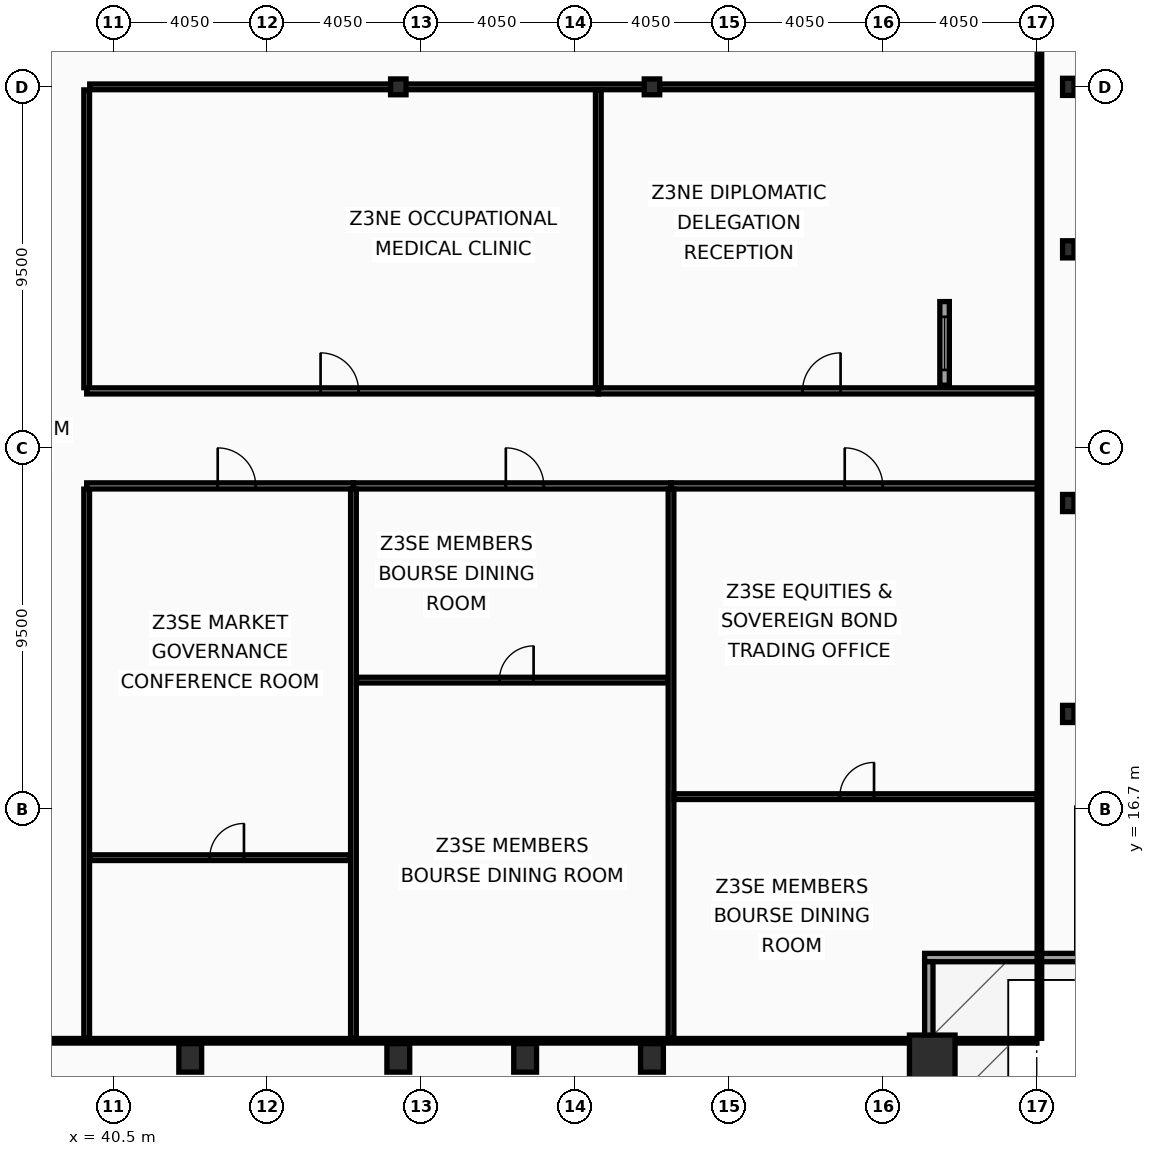
"""IFC4 building model, lengths in metres.
Left out: names, types, materials, properties, quantities, classifications, styles, units other than length and angle.
Written with IfcOpenShell. Run it as: python <this file> out.ifc"""

import sys

from ifc_helpers import new_model, si_unit, direction, frame, frame_2d, origin, origin_2d, place, context, subcontext, project, spatial, rectangle, hollow_rectangle, i_section, extrude, element, fill, save


model = new_model("IFC4")
c1 = context("Model", 3, precision=1e-05, world=origin(), true_north=direction((0.0, 1.0)))
c2 = subcontext(c1, "Body", "Model", "MODEL_VIEW")
j1 = project(units=[si_unit("LENGTHUNIT", "METRE"), si_unit("PLANEANGLEUNIT", "RADIAN")], contexts=[c1])
p1 = place(None, origin())
s1 = spatial("IfcSite", under=j1, at=p1, CompositionType="ELEMENT")
p2 = place(p1, origin())
s2 = spatial("IfcBuilding", under=s1, at=p2, CompositionType="ELEMENT")
p3 = place(p2, frame((0.0, 0.0, 188.6)))
s3 = spatial("IfcBuildingStorey", under=s2, at=p3, CompositionType="ELEMENT", Elevation=188.6)
p4 = place(p3, frame((62.05, 10.15, 0.0), z_axis=(0.0, 0.0, 1.0), x_axis=(1.0, 0.0, 0.0)))
e1 = element("IfcColumn", 1, at=p4, inside=s3, PredefinedType="COLUMN", context=c2, shape_type="SweptSolid", body=[
    extrude(hollow_rectangle(XDim=1.2, YDim=1.2, WallThickness=0.06, at=origin_2d()), origin(), (0.0, 0.0, 1.0), 3.6),
])
for number, where, z_axis, x_axis in (
    (2, (42.525, 10.15, 0.0), (0.0, 0.0, 1.0), (1.0, 0.0, 0.0)),
    (3, (48.0, 10.15, 0.0), (0.0, 0.0, 1.0), (1.0, 0.0, 0.0)),
    (4, (51.337, 10.15, 0.0), (0.0, 0.0, 1.0), (1.0, 0.0, 0.0)),
    (5, (54.675, 10.15, 0.0), (0.0, 0.0, 1.0), (1.0, 0.0, 0.0)),
):
    element("IfcColumn", number, at=place(p3, frame(where, z_axis=z_axis, x_axis=x_axis)), inside=s3, PredefinedType="COLUMN", context=c2, shape_type="SweptSolid", body=[
        extrude(hollow_rectangle(XDim=0.6, YDim=0.75, WallThickness=0.045, at=origin_2d()), origin(), (0.0, 0.0, 1.0), 3.6),
    ])
for number, where, z_axis, x_axis in (
    (6, (65.63, 19.2, 0.0), (0.0, 0.0, 1.0), (1.0, 0.0, 0.0)),
    (7, (65.63, 24.75, 0.0), (0.0, 0.0, 1.0), (1.0, 0.0, 0.0)),
    (8, (65.63, 31.425, 0.0), (0.0, 0.0, 1.0), (1.0, 0.0, 0.0)),
    (9, (65.63, 35.7, 0.0), (0.0, 0.0, 1.0), (1.0, 0.0, 0.0)),
):
    element("IfcColumn", number, at=place(p3, frame(where, z_axis=z_axis, x_axis=x_axis)), inside=s3, PredefinedType="COLUMN", context=c2, shape_type="SweptSolid", body=[
        extrude(i_section(OverallWidth=0.3, OverallDepth=0.45, WebThickness=0.014, FlangeThickness=0.026, at=origin_2d()), origin(), (0.0, 0.0, 1.0), 3.6),
    ])
for number, where, z_axis, x_axis in (
    (10, (48.0, 35.7, 0.0), (0.0, 0.0, 1.0), (1.0, 0.0, 0.0)),
    (11, (54.675, 35.7, 0.0), (0.0, 0.0, 1.0), (1.0, 0.0, 0.0)),
):
    element("IfcColumn", number, at=place(p3, frame(where, z_axis=z_axis, x_axis=x_axis)), inside=s3, PredefinedType="COLUMN", context=c2, shape_type="SweptSolid", body=[
        extrude(i_section(OverallWidth=0.406, OverallDepth=0.416, WebThickness=0.03, FlangeThickness=0.048, at=origin_2d()), origin(), (0.0, 0.0, 1.0), 3.6),
    ])
p5 = place(p3, frame((66.07, 12.79, 0.0), z_axis=(0.0, 0.0, 1.0), x_axis=(-1.0, 0.0, 0.0)))
e12 = element("IfcWall", 12, at=p5, inside=s3, PredefinedType="SOLIDWALL", context=c2, shape_type="SweptSolid", body=[
    extrude(rectangle(XDim=4.22, YDim=0.22, at=frame_2d((2.11, 0.0))), origin(), (0.0, 0.0, 1.0), 2.83),
])
p6 = place(p3, frame((61.96, 12.68, 0.0), z_axis=(0.0, 0.0, 1.0), x_axis=(0.0, -1.0, 0.0)))
e13 = element("IfcWall", 13, at=p6, inside=s3, PredefinedType="SOLIDWALL", context=c2, shape_type="SweptSolid", body=[
    extrude(rectangle(XDim=3.91, YDim=0.22, at=frame_2d((1.955, 0.0))), origin(), (0.0, 0.0, 1.0), 2.83),
])
p7 = place(p3, frame((62.375, 27.85, 0.0), z_axis=(0.0, 0.0, 1.0), x_axis=(0.0, 1.0, 0.0)))
e14 = element("IfcWall", 14, at=p7, inside=s3, PredefinedType="PARAPET", context=c2, shape_type="SweptSolid", body=[
    extrude(rectangle(XDim=2.2, YDim=0.25, at=frame_2d((1.1, 0.0))), origin(), (0.0, 0.0, 1.0), 0.88),
])
p8 = place(p7, frame((0.4, 0.0, 0.16)))
e15 = element("IfcOpeningElement", 15, at=p8, cuts=e14, PredefinedType="OPENING", context=c2, shape_type="SweptSolid", body=[
    extrude(rectangle(XDim=1.4, YDim=0.5, at=frame_2d((0.7, 0.25))), frame((0.0, 0.135, 0.0), z_axis=(0.0, -1.0, 0.0), x_axis=(1.0, 0.0, 0.0)), (0.0, 0.0, 1.0), 0.27),
])
p9 = place(p3, frame((39.8, 10.665, 0.0), z_axis=(0.0, 0.0, 1.0), x_axis=(0.0, 1.0, 0.0)))
e16 = element("IfcWall", 16, at=p9, inside=s3, PredefinedType="PARTITIONING", context=c2, shape_type="SweptSolid", body=[
    extrude(rectangle(XDim=14.45, YDim=0.15, at=frame_2d((7.225, 0.0))), origin(), (0.0, 0.0, 1.0), 2.93),
])
p10 = place(p3, frame((39.8, 27.785, 0.0), z_axis=(0.0, 0.0, 1.0), x_axis=(0.0, 1.0, 0.0)))
e17 = element("IfcWall", 17, at=p10, inside=s3, PredefinedType="PARTITIONING", context=c2, shape_type="SweptSolid", body=[
    extrude(rectangle(XDim=7.835, YDim=0.15, at=frame_2d((3.917, 0.0))), origin(), (0.0, 0.0, 1.0), 2.93),
])
p11 = place(p3, frame((39.88, 35.7, 0.0), z_axis=(0.0, 0.0, 1.0), x_axis=(1.0, 0.0, 0.0)))
e18 = element("IfcWall", 18, at=p11, inside=s3, PredefinedType="PARTITIONING", context=c2, shape_type="SweptSolid", body=[
    extrude(rectangle(XDim=24.925, YDim=0.15, at=frame_2d((12.462, 0.0))), origin(), (0.0, 0.0, 1.0), 2.73),
])
p12 = place(p3, frame((39.8, 25.2, 0.0), z_axis=(0.0, 0.0, 1.0), x_axis=(1.0, 0.0, 0.0)))
e19 = element("IfcWall", 19, at=p12, inside=s3, PredefinedType="PARTITIONING", context=c2, shape_type="SweptSolid", body=[
    extrude(rectangle(XDim=7.02, YDim=0.16, at=frame_2d((3.51, 0.0))), origin(), (0.0, 0.0, 1.0), 2.73),
])
p13 = place(p12, frame((3.448, 0.0, 0.0)))
e20 = element("IfcOpeningElement", 20, at=p13, cuts=e19, PredefinedType="OPENING", context=c2, shape_type="SweptSolid", body=[
    extrude(rectangle(XDim=1.0, YDim=2.05, at=frame_2d((0.5, 1.025))), frame((0.0, 0.09, 0.0), z_axis=(0.0, -1.0, 0.0), x_axis=(1.0, 0.0, 0.0)), (0.0, 0.0, 1.0), 0.18),
])
p14 = place(p3, frame((39.88, 15.418, 0.0), z_axis=(0.0, 0.0, 1.0), x_axis=(1.0, 0.0, 0.0)))
e21 = element("IfcWall", 21, at=p14, inside=s3, PredefinedType="PARTITIONING", context=c2, shape_type="SweptSolid", body=[
    extrude(rectangle(XDim=6.86, YDim=0.15, at=frame_2d((3.43, 0.0))), origin(), (0.0, 0.0, 1.0), 2.73),
])
p15 = place(p14, frame((3.159, 0.0, 0.0)))
e22 = element("IfcOpeningElement", 22, at=p15, cuts=e21, PredefinedType="OPENING", context=c2, shape_type="SweptSolid", body=[
    extrude(rectangle(XDim=0.9, YDim=2.05, at=frame_2d((0.45, 1.025))), frame((0.0, 0.085, 0.0), z_axis=(0.0, -1.0, 0.0), x_axis=(1.0, 0.0, 0.0)), (0.0, 0.0, 1.0), 0.17),
])
p16 = place(p3, frame((46.82, 25.2, 0.0), z_axis=(0.0, 0.0, 1.0), x_axis=(1.0, 0.0, 0.0)))
e23 = element("IfcWall", 23, at=p16, inside=s3, PredefinedType="PARTITIONING", context=c2, shape_type="SweptSolid", body=[
    extrude(rectangle(XDim=8.357, YDim=0.16, at=frame_2d((4.178, 0.0))), origin(), (0.0, 0.0, 1.0), 2.73),
])
p17 = place(p16, frame((4.01, 0.0, 0.0)))
e24 = element("IfcOpeningElement", 24, at=p17, cuts=e23, PredefinedType="OPENING", context=c2, shape_type="SweptSolid", body=[
    extrude(rectangle(XDim=1.0, YDim=2.05, at=frame_2d((0.5, 1.025))), frame((0.0, 0.09, 0.0), z_axis=(0.0, -1.0, 0.0), x_axis=(1.0, 0.0, 0.0)), (0.0, 0.0, 1.0), 0.18),
])
p18 = place(p3, frame((46.82, 10.665, 0.0), z_axis=(0.0, 0.0, 1.0), x_axis=(0.0, 1.0, 0.0)))
e25 = element("IfcWall", 25, at=p18, inside=s3, PredefinedType="PARTITIONING", context=c2, shape_type="SweptSolid", body=[
    extrude(rectangle(XDim=14.45, YDim=0.15, at=frame_2d((7.225, 0.0))), origin(), (0.0, 0.0, 1.0), 2.93),
])
p19 = place(p3, frame((46.9, 20.09, 0.0), z_axis=(0.0, 0.0, 1.0), x_axis=(1.0, 0.0, 0.0)))
e26 = element("IfcWall", 26, at=p19, inside=s3, PredefinedType="PARTITIONING", context=c2, shape_type="SweptSolid", body=[
    extrude(rectangle(XDim=8.197, YDim=0.15, at=frame_2d((4.098, 0.0))), origin(), (0.0, 0.0, 1.0), 2.73),
])
p20 = place(p19, frame((3.76, 0.0, 0.0)))
e27 = element("IfcOpeningElement", 27, at=p20, cuts=e26, PredefinedType="OPENING", context=c2, shape_type="SweptSolid", body=[
    extrude(rectangle(XDim=0.9, YDim=2.05, at=frame_2d((0.45, 1.025))), frame((0.0, 0.085, 0.0), z_axis=(0.0, -1.0, 0.0), x_axis=(1.0, 0.0, 0.0)), (0.0, 0.0, 1.0), 0.17),
])
p21 = place(p3, frame((55.176, 25.2, 0.0), z_axis=(0.0, 0.0, 1.0), x_axis=(1.0, 0.0, 0.0)))
e28 = element("IfcWall", 28, at=p21, inside=s3, PredefinedType="PARTITIONING", context=c2, shape_type="SweptSolid", body=[
    extrude(rectangle(XDim=9.694, YDim=0.16, at=frame_2d((4.847, 0.0))), origin(), (0.0, 0.0, 1.0), 3.44),
])
p22 = place(p21, frame((4.571, 0.0, 0.0)))
e29 = element("IfcOpeningElement", 29, at=p22, cuts=e28, PredefinedType="OPENING", context=c2, shape_type="SweptSolid", body=[
    extrude(rectangle(XDim=1.0, YDim=2.05, at=frame_2d((0.5, 1.025))), frame((0.0, 0.09, 0.0), z_axis=(0.0, -1.0, 0.0), x_axis=(1.0, 0.0, 0.0)), (0.0, 0.0, 1.0), 0.18),
])
p23 = place(p3, frame((55.176, 10.665, 0.0), z_axis=(0.0, 0.0, 1.0), x_axis=(0.0, 1.0, 0.0)))
e30 = element("IfcWall", 30, at=p23, inside=s3, PredefinedType="PARTITIONING", context=c2, shape_type="SweptSolid", body=[
    extrude(rectangle(XDim=14.45, YDim=0.15, at=frame_2d((7.225, 0.0))), origin(), (0.0, 0.0, 1.0), 2.73),
])
p24 = place(p3, frame((55.256, 17.024, 0.0), z_axis=(0.0, 0.0, 1.0), x_axis=(1.0, 0.0, 0.0)))
e31 = element("IfcWall", 31, at=p24, inside=s3, PredefinedType="PARTITIONING", context=c2, shape_type="SweptSolid", body=[
    extrude(rectangle(XDim=9.549, YDim=0.15, at=frame_2d((4.774, 0.0))), origin(), (0.0, 0.0, 1.0), 2.83),
])
p25 = place(p24, frame((4.362, 0.0, 0.0)))
e32 = element("IfcOpeningElement", 32, at=p25, cuts=e31, PredefinedType="OPENING", context=c2, shape_type="SweptSolid", body=[
    extrude(rectangle(XDim=0.9, YDim=2.05, at=frame_2d((0.45, 1.025))), frame((0.0, 0.085, 0.0), z_axis=(0.0, -1.0, 0.0), x_axis=(1.0, 0.0, 0.0)), (0.0, 0.0, 1.0), 0.17),
])
p26 = place(p3, frame((39.8, 27.7, 0.0), z_axis=(0.0, 0.0, 1.0), x_axis=(1.0, 0.0, 0.0)))
e33 = element("IfcWall", 33, at=p26, inside=s3, PredefinedType="PARTITIONING", context=c2, shape_type="SweptSolid", body=[
    extrude(rectangle(XDim=13.463, YDim=0.16, at=frame_2d((6.732, 0.0))), origin(), (0.0, 0.0, 1.0), 2.73),
])
p27 = place(p26, frame((6.155, 0.0, 0.0)))
e34 = element("IfcOpeningElement", 34, at=p27, cuts=e33, PredefinedType="OPENING", context=c2, shape_type="SweptSolid", body=[
    extrude(rectangle(XDim=1.0, YDim=2.05, at=frame_2d((0.5, 1.025))), frame((0.0, 0.09, 0.0), z_axis=(0.0, -1.0, 0.0), x_axis=(1.0, 0.0, 0.0)), (0.0, 0.0, 1.0), 0.18),
])
p28 = place(p3, frame((53.263, 27.7, 0.0), z_axis=(0.0, 0.0, 1.0), x_axis=(1.0, 0.0, 0.0)))
e35 = element("IfcWall", 35, at=p28, inside=s3, PredefinedType="PARTITIONING", context=c2, shape_type="SweptSolid", body=[
    extrude(rectangle(XDim=11.607, YDim=0.16, at=frame_2d((5.803, 0.0))), origin(), (0.0, 0.0, 1.0), 2.73),
])
p29 = place(p28, frame((5.375, 0.0, 0.0)))
e36 = element("IfcOpeningElement", 36, at=p29, cuts=e35, PredefinedType="OPENING", context=c2, shape_type="SweptSolid", body=[
    extrude(rectangle(XDim=1.0, YDim=2.05, at=frame_2d((0.5, 1.025))), frame((0.0, 0.09, 0.0), z_axis=(0.0, -1.0, 0.0), x_axis=(1.0, 0.0, 0.0)), (0.0, 0.0, 1.0), 0.18),
])
p30 = place(p3, frame((53.263, 27.785, 0.0), z_axis=(0.0, 0.0, 1.0), x_axis=(0.0, 1.0, 0.0)))
e37 = element("IfcWall", 37, at=p30, inside=s3, PredefinedType="PARTITIONING", context=c2, shape_type="SweptSolid", body=[
    extrude(rectangle(XDim=7.835, YDim=0.15, at=frame_2d((3.917, 0.0))), origin(), (0.0, 0.0, 1.0), 2.93),
])
p31 = place(p3, frame((64.87, 10.665, 0.0), z_axis=(0.0, 0.0, 1.0), x_axis=(0.0, 1.0, 0.0)))
e38 = element("IfcWall", 38, at=p31, inside=s3, PredefinedType="PARTITIONING", context=c2, shape_type="SweptSolid", body=[
    extrude(rectangle(XDim=42.11, YDim=0.12, at=frame_2d((21.055, 0.0))), origin(), (0.0, 0.0, 1.0), 2.73),
])
p32 = place(p3, frame((8.095, 10.6, 0.0), z_axis=(0.0, 0.0, 1.0), x_axis=(1.0, 0.0, 0.0)))
e39 = element("IfcWall", 39, at=p32, inside=s3, PredefinedType="PARTITIONING", context=c2, shape_type="SweptSolid", body=[
    extrude(rectangle(XDim=56.71, YDim=0.12, at=frame_2d((28.355, 0.0))), origin(), (0.0, 0.0, 1.0), 2.73),
])
p33 = place(p8, origin())
e40 = element("IfcWindow", 40, at=p33, inside=s3, PartitioningType="SINGLE_PANEL", PredefinedType="SKYLIGHT", context=c2, shape_type="SweptSolid", body=[
    extrude(rectangle(XDim=1.4, YDim=0.5, at=frame_2d((0.7, 0.25))), frame((0.0, 0.03, 0.0), z_axis=(0.0, -1.0, 0.0), x_axis=(1.0, 0.0, 0.0)), (0.0, 0.0, 1.0), 0.06),
])
fill(e15, e40)
p34 = place(p13, origin())
e41 = element("IfcDoor", 41, at=p34, inside=s3, OperationType="SINGLE_SWING_LEFT", PredefinedType="DOOR", context=c2, shape_type="SweptSolid", body=[
    extrude(rectangle(XDim=1.0, YDim=2.05, at=frame_2d((0.5, 1.025))), frame((0.0, 0.025, 0.0), z_axis=(0.0, -1.0, 0.0), x_axis=(1.0, 0.0, 0.0)), (0.0, 0.0, 1.0), 0.05),
])
fill(e20, e41)
p35 = place(p15, origin())
e42 = element("IfcDoor", 42, at=p35, inside=s3, OperationType="SINGLE_SWING_RIGHT", PredefinedType="DOOR", context=c2, shape_type="SweptSolid", body=[
    extrude(rectangle(XDim=0.9, YDim=2.05, at=frame_2d((0.45, 1.025))), frame((0.0, 0.025, 0.0), z_axis=(0.0, -1.0, 0.0), x_axis=(1.0, 0.0, 0.0)), (0.0, 0.0, 1.0), 0.05),
])
fill(e22, e42)
p36 = place(p17, origin())
e43 = element("IfcDoor", 43, at=p36, inside=s3, OperationType="SINGLE_SWING_LEFT", PredefinedType="DOOR", context=c2, shape_type="SweptSolid", body=[
    extrude(rectangle(XDim=1.0, YDim=2.05, at=frame_2d((0.5, 1.025))), frame((0.0, 0.025, 0.0), z_axis=(0.0, -1.0, 0.0), x_axis=(1.0, 0.0, 0.0)), (0.0, 0.0, 1.0), 0.05),
])
fill(e24, e43)
p37 = place(p20, origin())
e44 = element("IfcDoor", 44, at=p37, inside=s3, OperationType="SINGLE_SWING_RIGHT", PredefinedType="DOOR", context=c2, shape_type="SweptSolid", body=[
    extrude(rectangle(XDim=0.9, YDim=2.05, at=frame_2d((0.45, 1.025))), frame((0.0, 0.025, 0.0), z_axis=(0.0, -1.0, 0.0), x_axis=(1.0, 0.0, 0.0)), (0.0, 0.0, 1.0), 0.05),
])
fill(e27, e44)
p38 = place(p22, origin())
e45 = element("IfcDoor", 45, at=p38, inside=s3, OperationType="SINGLE_SWING_LEFT", PredefinedType="DOOR", context=c2, shape_type="SweptSolid", body=[
    extrude(rectangle(XDim=1.0, YDim=2.05, at=frame_2d((0.5, 1.025))), frame((0.0, 0.025, 0.0), z_axis=(0.0, -1.0, 0.0), x_axis=(1.0, 0.0, 0.0)), (0.0, 0.0, 1.0), 0.05),
])
fill(e29, e45)
p39 = place(p25, origin())
e46 = element("IfcDoor", 46, at=p39, inside=s3, OperationType="SINGLE_SWING_RIGHT", PredefinedType="DOOR", context=c2, shape_type="SweptSolid", body=[
    extrude(rectangle(XDim=0.9, YDim=2.05, at=frame_2d((0.45, 1.025))), frame((0.0, 0.025, 0.0), z_axis=(0.0, -1.0, 0.0), x_axis=(1.0, 0.0, 0.0)), (0.0, 0.0, 1.0), 0.05),
])
fill(e32, e46)
p40 = place(p27, origin())
e47 = element("IfcDoor", 47, at=p40, inside=s3, OperationType="SINGLE_SWING_LEFT", PredefinedType="DOOR", context=c2, shape_type="SweptSolid", body=[
    extrude(rectangle(XDim=1.0, YDim=2.05, at=frame_2d((0.5, 1.025))), frame((0.0, 0.025, 0.0), z_axis=(0.0, -1.0, 0.0), x_axis=(1.0, 0.0, 0.0)), (0.0, 0.0, 1.0), 0.05),
])
fill(e34, e47)
p41 = place(p29, origin())
e48 = element("IfcDoor", 48, at=p41, inside=s3, OperationType="SINGLE_SWING_RIGHT", PredefinedType="DOOR", context=c2, shape_type="SweptSolid", body=[
    extrude(rectangle(XDim=1.0, YDim=2.05, at=frame_2d((0.5, 1.025))), frame((0.0, 0.025, 0.0), z_axis=(0.0, -1.0, 0.0), x_axis=(1.0, 0.0, 0.0)), (0.0, 0.0, 1.0), 0.05),
])
fill(e36, e48)
save(model, sys.argv[1])
